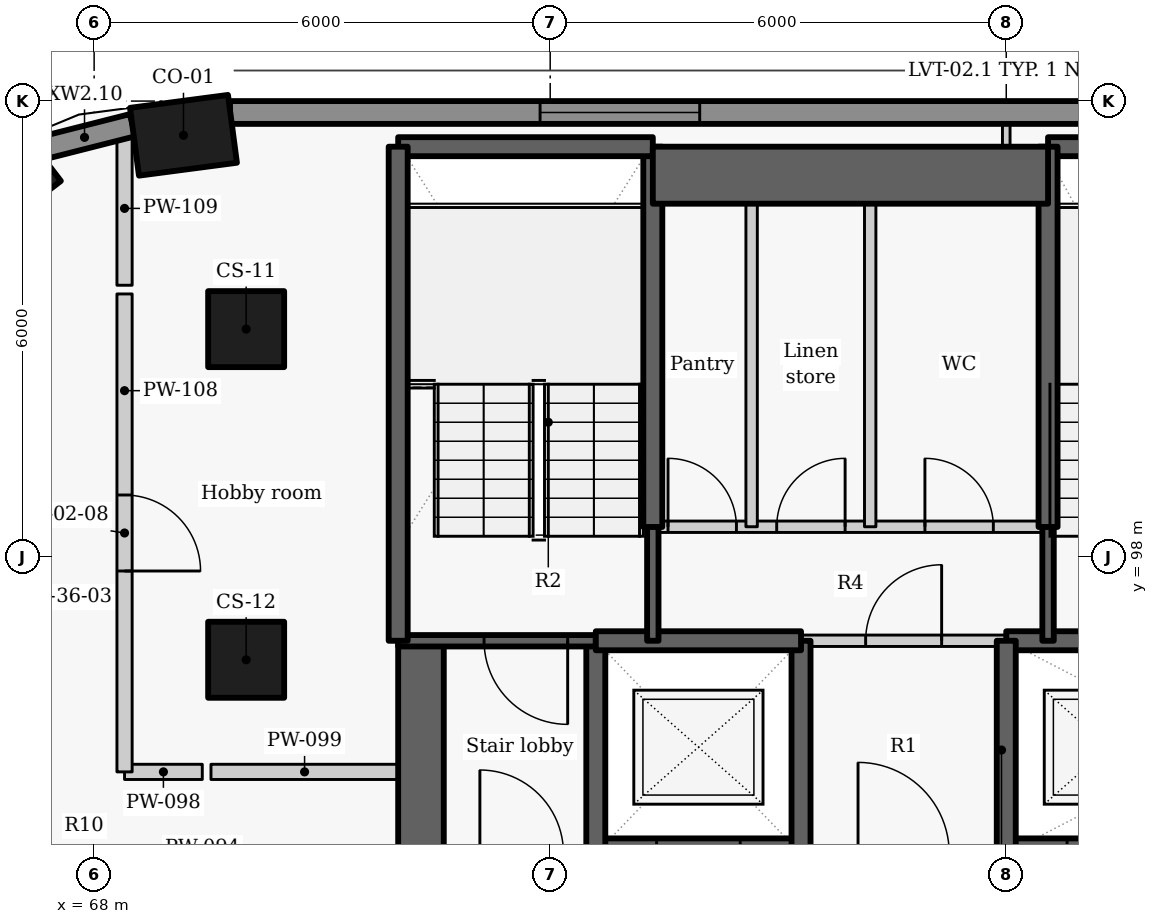
"""IFC4 building model, lengths in metres.
Left out: names, types, materials, properties, quantities, classifications, styles, units other than length and angle.
Written with IfcOpenShell. Run it as: python <this file> out.ifc"""

import sys

from ifc_helpers import new_model, si_unit, direction, frame, frame_2d, origin, origin_2d, place, context, subcontext, project, spatial, rectangle, extrude, element, fill, save


model = new_model("IFC4")
c1 = context("Model", 3, precision=1e-05, world=origin(), true_north=direction((0.0, 1.0)))
c2 = subcontext(c1, "Body", "Model", "MODEL_VIEW")
j1 = project(units=[si_unit("LENGTHUNIT", "METRE"), si_unit("PLANEANGLEUNIT", "RADIAN")], contexts=[c1])
p1 = place(None, origin())
s1 = spatial("IfcSite", under=j1, at=p1, CompositionType="ELEMENT")
p2 = place(p1, origin())
s2 = spatial("IfcBuilding", under=s1, at=p2, CompositionType="ELEMENT")
p3 = place(p2, frame((0.0, 0.0, 166.8)))
s3 = spatial("IfcBuildingStorey", under=s2, at=p3, CompositionType="ELEMENT", Elevation=166.8)
for number, where, z_axis, x_axis in (
    (1, (69.175, 103.55, 0.0), (0.0, 0.0, 1.0), (-0.991, -0.131, 0.0)),
    (2, (66.773, 102.91, 0.0), (0.0, 0.0, 1.0), (-0.793, -0.609, 0.0)),
):
    element("IfcColumn", number, at=place(p3, frame(where, z_axis=z_axis, x_axis=x_axis)), inside=s3, PredefinedType="COLUMN", context=c2, shape_type="SweptSolid", body=[
        extrude(rectangle(XDim=1.3, YDim=0.9, at=origin_2d()), origin(), (0.0, 0.0, 1.0), 3.3),
    ])
for number, where, z_axis, x_axis in (
    (3, (70.0, 101.0, 0.0), (0.0, 0.0, 1.0), (0.0, -1.0, 0.0)),
    (4, (70.0, 96.65, 0.0), (0.0, 0.0, 1.0), (0.0, -1.0, 0.0)),
):
    element("IfcColumn", number, at=place(p3, frame(where, z_axis=z_axis, x_axis=x_axis)), inside=s3, PredefinedType="COLUMN", context=c2, shape_type="SweptSolid", body=[
        extrude(rectangle(XDim=1.0, YDim=1.0, at=origin_2d()), origin(), (0.0, 0.0, 1.0), 3.3),
    ])
p4 = place(p3, frame((90.179, 103.85, 0.0), z_axis=(0.0, 0.0, 1.0), x_axis=(-1.0, 0.0, 0.0)))
e5 = element("IfcWall", 5, at=p4, inside=s3, PredefinedType="SOLIDWALL", context=c2, shape_type="SweptSolid", body=[
    extrude(rectangle(XDim=20.391, YDim=0.3, at=frame_2d((10.196, 0.0))), origin(), (0.0, 0.0, 1.0), 2.05),
])
p5 = place(p4, frame((4.051, 0.0, 0.9)))
e6 = element("IfcOpeningElement", 6, at=p5, cuts=e5, PredefinedType="OPENING", context=c2, shape_type="SweptSolid", body=[
    extrude(rectangle(XDim=2.1, YDim=1.1, at=frame_2d((1.05, 0.55))), frame((0.0, 0.16, 0.0), z_axis=(0.0, -1.0, 0.0), x_axis=(1.0, 0.0, 0.0)), (0.0, 0.0, 1.0), 0.32),
])
p6 = place(p4, frame((14.212, 0.0, 0.9)))
e7 = element("IfcOpeningElement", 7, at=p6, cuts=e5, PredefinedType="OPENING", context=c2, shape_type="SweptSolid", body=[
    extrude(rectangle(XDim=2.1, YDim=1.1, at=frame_2d((1.05, 0.55))), frame((0.0, 0.16, 0.0), z_axis=(0.0, -1.0, 0.0), x_axis=(1.0, 0.0, 0.0)), (0.0, 0.0, 1.0), 0.32),
])
p7 = place(p3, frame((68.506, 103.683, 0.0), z_axis=(0.0, 0.0, 1.0), x_axis=(-0.96924493129, -0.246098076322, 0.0)))
e8 = element("IfcWall", 8, at=p7, inside=s3, PredefinedType="SOLIDWALL", context=c2, shape_type="SweptSolid", body=[
    extrude(rectangle(XDim=1.305, YDim=0.3, at=frame_2d((0.653, 0.0))), origin(), (0.0, 0.0, 1.0), 2.05),
])
p8 = place(p3, frame((72.3, 87.8, -0.275), z_axis=(0.0, 0.0, 1.0), x_axis=(0.0, 1.0, 0.0)))
e9 = element("IfcWall", 9, at=p8, inside=s3, PredefinedType="SHEAR", context=c2, shape_type="SweptSolid", body=[
    extrude(rectangle(XDim=9.1, YDim=0.6, at=frame_2d((4.55, 0.0))), origin(), (0.0, 0.0, 1.0), 3.225),
])
p9 = place(p8, frame((3.852, 0.0, 0.275)))
e10 = element("IfcOpeningElement", 10, at=p9, cuts=e9, PredefinedType="OPENING", context=c2, shape_type="SweptSolid", body=[
    extrude(rectangle(XDim=1.5, YDim=2.1, at=frame_2d((0.75, 1.05))), frame((0.0, 0.31, 0.0), z_axis=(0.0, -1.0, 0.0), x_axis=(1.0, 0.0, 0.0)), (0.0, 0.0, 1.0), 0.62),
])
p10 = place(p3, frame((74.597, 94.1, -0.275), z_axis=(0.0, 0.0, 1.0), x_axis=(1.0, 0.0, 0.0)))
e11 = element("IfcWall", 11, at=p10, inside=s3, PredefinedType="SHEAR", context=c2, shape_type="SweptSolid", body=[
    extrude(rectangle(XDim=2.706, YDim=0.4, at=frame_2d((1.353, 0.0))), origin(), (0.0, 0.0, 1.0), 3.225),
])
p11 = place(p10, frame((0.803, 0.0, 0.275)))
e12 = element("IfcOpeningElement", 12, at=p11, cuts=e11, PredefinedType="OPENING", context=c2, shape_type="SweptSolid", body=[
    extrude(rectangle(XDim=1.1, YDim=2.1, at=frame_2d((0.55, 1.05))), frame((0.0, 0.21, 0.0), z_axis=(0.0, -1.0, 0.0), x_axis=(1.0, 0.0, 0.0)), (0.0, 0.0, 1.0), 0.42),
])
p12 = place(p3, frame((79.997, 94.1, -0.275), z_axis=(0.0, 0.0, 1.0), x_axis=(1.0, 0.0, 0.0)))
e13 = element("IfcWall", 13, at=p12, inside=s3, PredefinedType="SHEAR", context=c2, shape_type="SweptSolid", body=[
    extrude(rectangle(XDim=5.406, YDim=0.4, at=frame_2d((2.703, 0.0))), origin(), (0.0, 0.0, 1.0), 3.225),
])
p13 = place(p12, frame((0.803, 0.0, 0.275)))
e14 = element("IfcOpeningElement", 14, at=p13, cuts=e13, PredefinedType="OPENING", context=c2, shape_type="SweptSolid", body=[
    extrude(rectangle(XDim=1.1, YDim=2.1, at=frame_2d((0.55, 1.05))), frame((0.0, 0.21, 0.0), z_axis=(0.0, -1.0, 0.0), x_axis=(1.0, 0.0, 0.0)), (0.0, 0.0, 1.0), 0.42),
])
p14 = place(p3, frame((74.6, 94.1, -0.275), z_axis=(0.0, 0.0, 1.0), x_axis=(0.0, 1.0, 0.0)))
e15 = element("IfcWall", 15, at=p14, inside=s3, PredefinedType="SHEAR", context=c2, shape_type="SweptSolid", body=[
    extrude(rectangle(XDim=2.8, YDim=0.25, at=frame_2d((1.4, 0.0))), origin(), (0.0, 0.0, 1.0), 3.225),
])
p15 = place(p3, frame((74.6, 96.9, -0.275), z_axis=(0.0, 0.0, 1.0), x_axis=(-1.0, 0.0, 0.0)))
e16 = element("IfcWall", 16, at=p15, inside=s3, PredefinedType="SHEAR", context=c2, shape_type="SweptSolid", body=[
    extrude(rectangle(XDim=2.6, YDim=0.15, at=frame_2d((1.3, 0.0))), origin(), (0.0, 0.0, 1.0), 3.225),
])
p16 = place(p15, frame((0.37, 0.0, 0.275)))
e17 = element("IfcOpeningElement", 17, at=p16, cuts=e16, PredefinedType="OPENING", context=c2, shape_type="SweptSolid", body=[
    extrude(rectangle(XDim=1.1, YDim=2.1, at=frame_2d((0.55, 1.05))), frame((0.0, 0.085, 0.0), z_axis=(0.0, -1.0, 0.0), x_axis=(1.0, 0.0, 0.0)), (0.0, 0.0, 1.0), 0.17),
])
p17 = place(p3, frame((77.3, 94.1, -0.275), z_axis=(0.0, 0.0, 1.0), x_axis=(0.0, 1.0, 0.0)))
e18 = element("IfcWall", 18, at=p17, inside=s3, PredefinedType="SHEAR", context=c2, shape_type="SweptSolid", body=[
    extrude(rectangle(XDim=2.8, YDim=0.25, at=frame_2d((1.4, 0.0))), origin(), (0.0, 0.0, 1.0), 3.225),
])
p18 = place(p3, frame((74.6, 96.9, -0.275), z_axis=(0.0, 0.0, 1.0), x_axis=(1.0, 0.0, 0.0)))
e19 = element("IfcWall", 19, at=p18, inside=s3, PredefinedType="SHEAR", context=c2, shape_type="SweptSolid", body=[
    extrude(rectangle(XDim=2.7, YDim=0.25, at=frame_2d((1.35, 0.0))), origin(), (0.0, 0.0, 1.0), 3.225),
])
p19 = place(p3, frame((80.0, 96.9, -0.275), z_axis=(0.0, 0.0, 1.0), x_axis=(1.0, 0.0, 0.0)))
e20 = element("IfcWall", 20, at=p19, inside=s3, PredefinedType="SHEAR", context=c2, shape_type="SweptSolid", body=[
    extrude(rectangle(XDim=8.0, YDim=0.25, at=frame_2d((4.0, 0.0))), origin(), (0.0, 0.0, 1.0), 3.225),
])
p20 = place(p19, frame((3.849, 0.0, 0.275)))
e21 = element("IfcOpeningElement", 21, at=p20, cuts=e20, PredefinedType="OPENING", context=c2, shape_type="SweptSolid", body=[
    extrude(rectangle(XDim=1.1, YDim=2.1, at=frame_2d((0.55, 1.05))), frame((0.0, 0.135, 0.0), z_axis=(0.0, -1.0, 0.0), x_axis=(1.0, 0.0, 0.0)), (0.0, 0.0, 1.0), 0.27),
])
p21 = place(p3, frame((80.0, 94.1, -0.275), z_axis=(0.0, 0.0, 1.0), x_axis=(0.0, 1.0, 0.0)))
e22 = element("IfcWall", 22, at=p21, inside=s3, PredefinedType="SHEAR", context=c2, shape_type="SweptSolid", body=[
    extrude(rectangle(XDim=2.8, YDim=0.25, at=frame_2d((1.4, 0.0))), origin(), (0.0, 0.0, 1.0), 3.225),
])
p22 = place(p3, frame((77.3, 96.9, 0.0), z_axis=(0.0, 0.0, 1.0), x_axis=(1.0, 0.0, 0.0)))
e23 = element("IfcWall", 23, at=p22, inside=s3, PredefinedType="PARTITIONING", context=c2, shape_type="SweptSolid", body=[
    extrude(rectangle(XDim=2.7, YDim=0.15, at=frame_2d((1.35, 0.0))), origin(), (0.0, 0.0, 1.0), 2.95),
])
p23 = place(p22, frame((0.85, 0.0, 0.0)))
e24 = element("IfcOpeningElement", 24, at=p23, cuts=e23, PredefinedType="OPENING", context=c2, shape_type="SweptSolid", body=[
    extrude(rectangle(XDim=1.0, YDim=2.1, at=frame_2d((0.5, 1.05))), frame((0.0, 0.085, 0.0), z_axis=(0.0, -1.0, 0.0), x_axis=(1.0, 0.0, 0.0)), (0.0, 0.0, 1.0), 0.17),
])
p24 = place(p3, frame((75.35, 96.9, -0.275), z_axis=(0.0, 0.0, 1.0), x_axis=(0.0, 1.0, 0.0)))
e25 = element("IfcWall", 25, at=p24, inside=s3, PredefinedType="SHEAR", context=c2, shape_type="SweptSolid", body=[
    extrude(rectangle(XDim=1.503, YDim=0.15, at=frame_2d((0.751, 0.0))), origin(), (0.0, 0.0, 1.0), 3.225),
])
p25 = place(p3, frame((75.35, 98.397, -0.275), z_axis=(0.0, 0.0, 1.0), x_axis=(0.0, 1.0, 0.0)))
e26 = element("IfcWall", 26, at=p25, inside=s3, PredefinedType="SHEAR", context=c2, shape_type="SweptSolid", body=[
    extrude(rectangle(XDim=5.003, YDim=0.25, at=frame_2d((2.501, 0.0))), origin(), (0.0, 0.0, 1.0), 3.225),
])
p26 = place(p3, frame((72.0, 103.4, -0.275), z_axis=(0.0, 0.0, 1.0), x_axis=(1.0, 0.0, 0.0)))
e27 = element("IfcWall", 27, at=p26, inside=s3, PredefinedType="SHEAR", context=c2, shape_type="SweptSolid", body=[
    extrude(rectangle(XDim=3.35, YDim=0.25, at=frame_2d((1.675, 0.0))), origin(), (0.0, 0.0, 1.0), 3.225),
])
p27 = place(p3, frame((80.55, 103.4, -0.275), z_axis=(0.0, 0.0, 1.0), x_axis=(1.0, 0.0, 0.0)))
e28 = element("IfcWall", 28, at=p27, inside=s3, PredefinedType="SHEAR", context=c2, shape_type="SweptSolid", body=[
    extrude(rectangle(XDim=2.85, YDim=0.25, at=frame_2d((1.425, 0.0))), origin(), (0.0, 0.0, 1.0), 3.225),
])
p28 = place(p3, frame((72.0, 96.9, -0.275), z_axis=(0.0, 0.0, 1.0), x_axis=(0.0, 1.0, 0.0)))
e29 = element("IfcWall", 29, at=p28, inside=s3, PredefinedType="SHEAR", context=c2, shape_type="SweptSolid", body=[
    extrude(rectangle(XDim=6.5, YDim=0.25, at=frame_2d((3.25, 0.0))), origin(), (0.0, 0.0, 1.0), 3.225),
])
p29 = place(p3, frame((80.55, 96.9, -0.275), z_axis=(0.0, 0.0, 1.0), x_axis=(0.0, 1.0, 0.0)))
e30 = element("IfcWall", 30, at=p29, inside=s3, PredefinedType="SHEAR", context=c2, shape_type="SweptSolid", body=[
    extrude(rectangle(XDim=1.503, YDim=0.15, at=frame_2d((0.751, 0.0))), origin(), (0.0, 0.0, 1.0), 3.225),
])
p30 = place(p3, frame((80.55, 98.397, -0.275), z_axis=(0.0, 0.0, 1.0), x_axis=(0.0, 1.0, 0.0)))
e31 = element("IfcWall", 31, at=p30, inside=s3, PredefinedType="SHEAR", context=c2, shape_type="SweptSolid", body=[
    extrude(rectangle(XDim=5.003, YDim=0.25, at=frame_2d((2.501, 0.0))), origin(), (0.0, 0.0, 1.0), 3.225),
])
p31 = place(p3, frame((75.35, 103.025, -0.275), z_axis=(0.0, 0.0, 1.0), x_axis=(1.0, 0.0, 0.0)))
e32 = element("IfcWall", 32, at=p31, inside=s3, PredefinedType="SHEAR", context=c2, shape_type="SweptSolid", body=[
    extrude(rectangle(XDim=5.2, YDim=0.75, at=frame_2d((2.6, 0.0))), origin(), (0.0, 0.0, 1.0), 3.225),
])
p32 = place(p3, frame((75.35, 98.4, 0.0), z_axis=(0.0, 0.0, 1.0), x_axis=(1.0, 0.0, 0.0)))
e33 = element("IfcWall", 33, at=p32, inside=s3, PredefinedType="PARTITIONING", context=c2, shape_type="SweptSolid", body=[
    extrude(rectangle(XDim=5.2, YDim=0.15, at=frame_2d((2.6, 0.0))), origin(), (0.0, 0.0, 1.0), 2.95),
])
p33 = place(p32, frame((0.2, 0.0, 0.0)))
e34 = element("IfcOpeningElement", 34, at=p33, cuts=e33, PredefinedType="OPENING", context=c2, shape_type="SweptSolid", body=[
    extrude(rectangle(XDim=0.9, YDim=2.1, at=frame_2d((0.45, 1.05))), frame((0.0, 0.085, 0.0), z_axis=(0.0, -1.0, 0.0), x_axis=(1.0, 0.0, 0.0)), (0.0, 0.0, 1.0), 0.17),
])
p34 = place(p32, frame((1.63, 0.0, 0.0)))
e35 = element("IfcOpeningElement", 35, at=p34, cuts=e33, PredefinedType="OPENING", context=c2, shape_type="SweptSolid", body=[
    extrude(rectangle(XDim=0.9, YDim=2.1, at=frame_2d((0.45, 1.05))), frame((0.0, 0.085, 0.0), z_axis=(0.0, -1.0, 0.0), x_axis=(1.0, 0.0, 0.0)), (0.0, 0.0, 1.0), 0.17),
])
p35 = place(p32, frame((3.58, 0.0, 0.0)))
e36 = element("IfcOpeningElement", 36, at=p35, cuts=e33, PredefinedType="OPENING", context=c2, shape_type="SweptSolid", body=[
    extrude(rectangle(XDim=0.9, YDim=2.1, at=frame_2d((0.45, 1.05))), frame((0.0, 0.085, 0.0), z_axis=(0.0, -1.0, 0.0), x_axis=(1.0, 0.0, 0.0)), (0.0, 0.0, 1.0), 0.17),
])
for number, where, z_axis, x_axis in (
    (37, (76.65, 98.4, 0.0), (0.0, 0.0, 1.0), (0.0, 1.0, 0.0)),
    (38, (78.21, 98.4, 0.0), (0.0, 0.0, 1.0), (0.0, 1.0, 0.0)),
):
    element("IfcWall", number, at=place(p3, frame(where, z_axis=z_axis, x_axis=x_axis)), inside=s3, PredefinedType="PARTITIONING", context=c2, shape_type="SweptSolid", body=[
        extrude(rectangle(XDim=5.0, YDim=0.15, at=frame_2d((2.5, 0.0))), origin(), (0.0, 0.0, 1.0), 2.95),
    ])
p36 = place(p3, frame((68.4, 95.175, 0.0), z_axis=(0.0, 0.0, 1.0), x_axis=(1.0, 0.0, 0.0)))
e39 = element("IfcWall", 39, at=p36, inside=s3, PredefinedType="PARTITIONING", context=c2, shape_type="SweptSolid", body=[
    extrude(rectangle(XDim=1.023, YDim=0.2, at=frame_2d((0.511, 0.0))), origin(), (0.0, 0.0, 1.0), 2.95),
])
p37 = place(p3, frame((69.537, 95.175, 0.0), z_axis=(0.0, 0.0, 1.0), x_axis=(1.0, 0.0, 0.0)))
e40 = element("IfcWall", 40, at=p37, inside=s3, PredefinedType="PARTITIONING", context=c2, shape_type="SweptSolid", body=[
    extrude(rectangle(XDim=2.463, YDim=0.2, at=frame_2d((1.231, 0.0))), origin(), (0.0, 0.0, 1.0), 2.43),
])
p38 = place(p3, frame((68.4, 101.463, 0.0), z_axis=(0.0, 0.0, 1.0), x_axis=(0.0, -1.0, 0.0)))
e41 = element("IfcWall", 41, at=p38, inside=s3, PredefinedType="PARTITIONING", context=c2, shape_type="SweptSolid", body=[
    extrude(rectangle(XDim=6.288, YDim=0.2, at=frame_2d((3.144, 0.0))), origin(), (0.0, 0.0, 1.0), 2.95),
])
p39 = place(p38, frame((2.645, 0.0, 0.0)))
e42 = element("IfcOpeningElement", 42, at=p39, cuts=e41, PredefinedType="OPENING", context=c2, shape_type="SweptSolid", body=[
    extrude(rectangle(XDim=1.0, YDim=2.1, at=frame_2d((0.5, 1.05))), frame((0.0, 0.11, 0.0), z_axis=(0.0, -1.0, 0.0), x_axis=(1.0, 0.0, 0.0)), (0.0, 0.0, 1.0), 0.22),
])
p40 = place(p3, frame((68.4, 101.577, 0.0), z_axis=(0.0, 0.0, 1.0), x_axis=(0.0, 1.0, 0.0)))
e43 = element("IfcWall", 43, at=p40, inside=s3, PredefinedType="PARTITIONING", context=c2, shape_type="SweptSolid", body=[
    extrude(rectangle(XDim=2.022, YDim=0.2, at=frame_2d((1.011, 0.0))), origin(), (0.0, 0.0, 1.0), 2.03),
])
p41 = place(p3, frame((80.0, 103.4, 0.0), z_axis=(0.0, 0.0, 1.0), x_axis=(0.0, 1.0, 0.0)))
e44 = element("IfcWall", 44, at=p41, inside=s3, PredefinedType="PARTITIONING", context=c2, shape_type="SweptSolid", body=[
    extrude(rectangle(XDim=0.3, YDim=0.1, at=frame_2d((0.15, 0.0))), origin(), (0.0, 0.0, 1.0), 2.95),
])
p42 = place(p6, origin())
e45 = element("IfcWindow", 45, at=p42, inside=s3, PartitioningType="SINGLE_PANEL", PredefinedType="WINDOW", context=c2, shape_type="SweptSolid", body=[
    extrude(rectangle(XDim=2.1, YDim=1.1, at=frame_2d((1.05, 0.55))), frame((0.0, 0.03, 0.0), z_axis=(0.0, -1.0, 0.0), x_axis=(1.0, 0.0, 0.0)), (0.0, 0.0, 1.0), 0.06),
])
fill(e7, e45)
p43 = place(p23, origin())
e46 = element("IfcDoor", 46, at=p43, inside=s3, OperationType="SINGLE_SWING_RIGHT", PredefinedType="DOOR", context=c2, shape_type="SweptSolid", body=[
    extrude(rectangle(XDim=1.0, YDim=2.1, at=frame_2d((0.5, 1.05))), frame((0.0, 0.025, 0.0), z_axis=(0.0, -1.0, 0.0), x_axis=(1.0, 0.0, 0.0)), (0.0, 0.0, 1.0), 0.05),
])
fill(e24, e46)
p44 = place(p33, origin())
e47 = element("IfcDoor", 47, at=p44, inside=s3, OperationType="SINGLE_SWING_LEFT", PredefinedType="DOOR", context=c2, shape_type="SweptSolid", body=[
    extrude(rectangle(XDim=0.9, YDim=2.1, at=frame_2d((0.45, 1.05))), frame((0.0, 0.025, 0.0), z_axis=(0.0, -1.0, 0.0), x_axis=(1.0, 0.0, 0.0)), (0.0, 0.0, 1.0), 0.05),
])
fill(e34, e47)
p45 = place(p34, origin())
e48 = element("IfcDoor", 48, at=p45, inside=s3, OperationType="SINGLE_SWING_RIGHT", PredefinedType="DOOR", context=c2, shape_type="SweptSolid", body=[
    extrude(rectangle(XDim=0.9, YDim=2.1, at=frame_2d((0.45, 1.05))), frame((0.0, 0.025, 0.0), z_axis=(0.0, -1.0, 0.0), x_axis=(1.0, 0.0, 0.0)), (0.0, 0.0, 1.0), 0.05),
])
fill(e35, e48)
p46 = place(p35, origin())
e49 = element("IfcDoor", 49, at=p46, inside=s3, OperationType="SINGLE_SWING_LEFT", PredefinedType="DOOR", context=c2, shape_type="SweptSolid", body=[
    extrude(rectangle(XDim=0.9, YDim=2.1, at=frame_2d((0.45, 1.05))), frame((0.0, 0.025, 0.0), z_axis=(0.0, -1.0, 0.0), x_axis=(1.0, 0.0, 0.0)), (0.0, 0.0, 1.0), 0.05),
])
fill(e36, e49)
p47 = place(p16, origin())
e50 = element("IfcDoor", 50, at=p47, inside=s3, OperationType="SINGLE_SWING_LEFT", PredefinedType="DOOR", context=c2, shape_type="SweptSolid", body=[
    extrude(rectangle(XDim=1.1, YDim=2.1, at=frame_2d((0.55, 1.05))), frame((0.0, 0.025, 0.0), z_axis=(0.0, -1.0, 0.0), x_axis=(1.0, 0.0, 0.0)), (0.0, 0.0, 1.0), 0.05),
])
fill(e17, e50)
p48 = place(p39, origin())
e51 = element("IfcDoor", 51, at=p48, inside=s3, OperationType="SINGLE_SWING_RIGHT", PredefinedType="DOOR", context=c2, shape_type="SweptSolid", body=[
    extrude(rectangle(XDim=1.0, YDim=2.1, at=frame_2d((0.5, 1.05))), frame((0.0, 0.025, 0.0), z_axis=(0.0, -1.0, 0.0), x_axis=(1.0, 0.0, 0.0)), (0.0, 0.0, 1.0), 0.05),
])
fill(e42, e51)
save(model, sys.argv[1])
